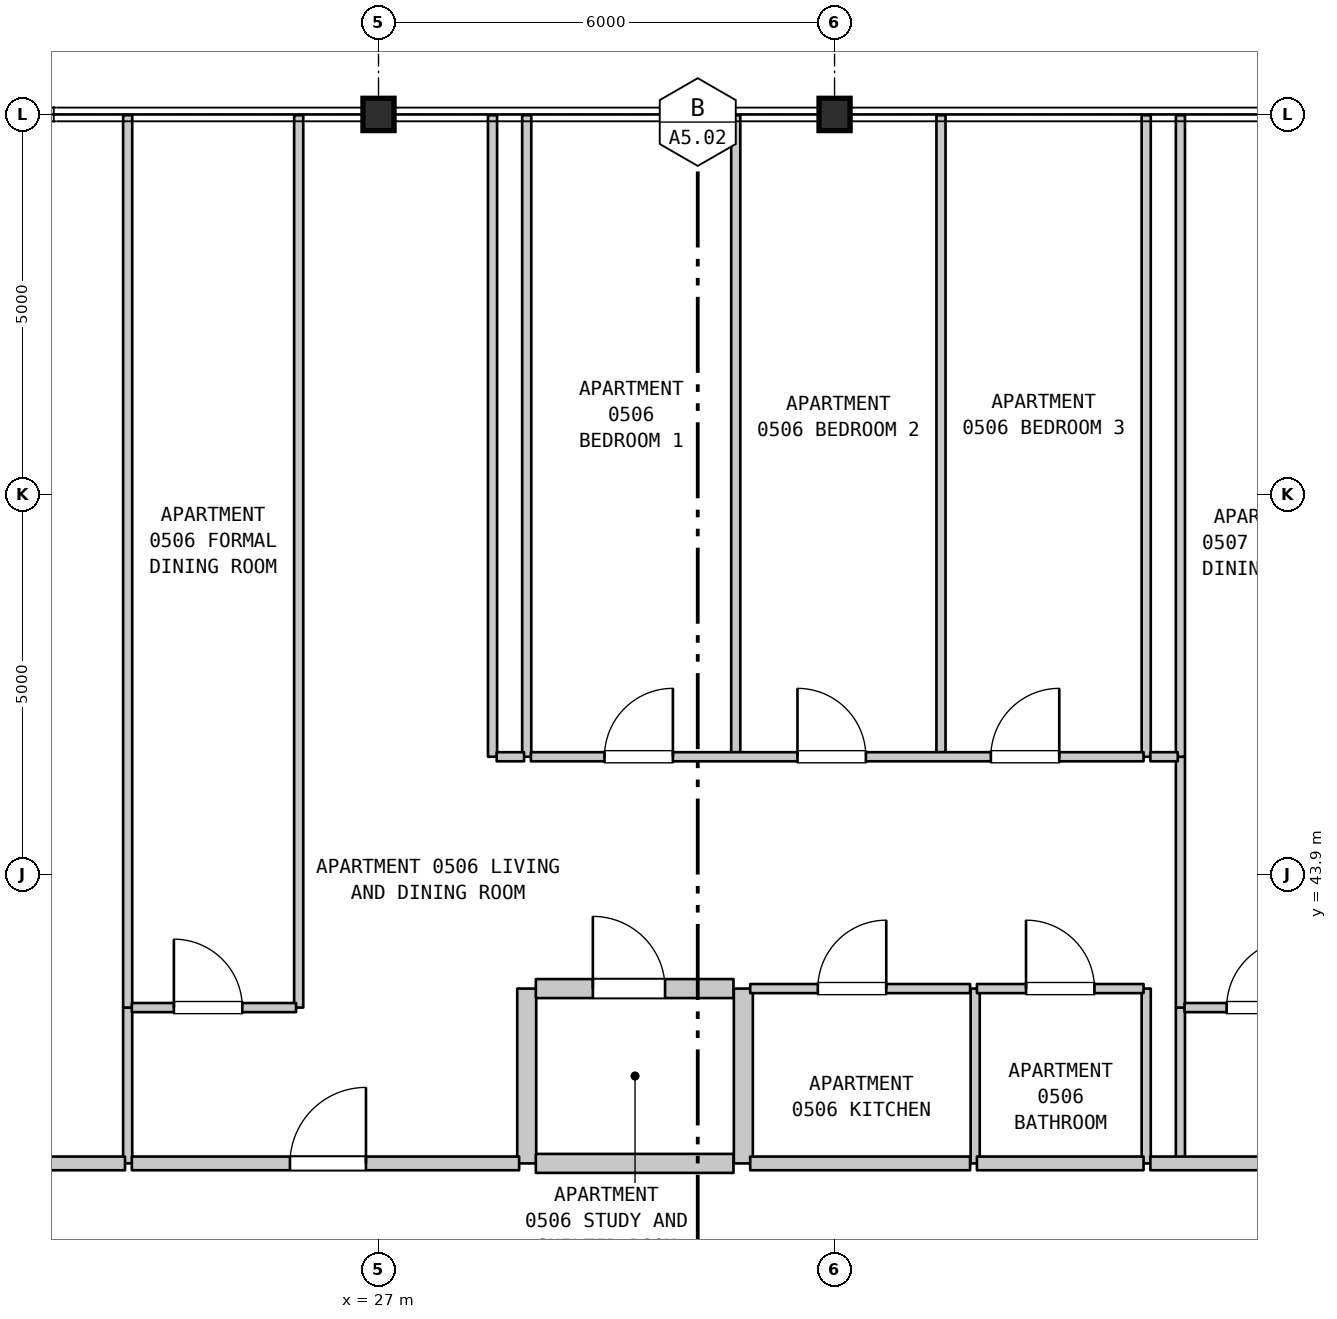
"""IFC4 building model, lengths in metres.
Left out: names, types, materials, properties, quantities, classifications, styles, units other than length and angle.
Written with IfcOpenShell. Run it as: python <this file> out.ifc"""

import sys

from ifc_helpers import new_model, si_unit, direction, frame, frame_2d, origin, origin_2d, place, context, subcontext, project, spatial, rectangle, i_section, extrude, element, fill, save


model = new_model("IFC4")
c1 = context("Model", 3, precision=1e-05, world=origin(), true_north=direction((0.0, 1.0)))
c2 = subcontext(c1, "Body", "Model", "MODEL_VIEW")
j1 = project(units=[si_unit("LENGTHUNIT", "METRE"), si_unit("PLANEANGLEUNIT", "RADIAN")], contexts=[c1])
p1 = place(None, origin())
s1 = spatial("IfcSite", under=j1, at=p1, CompositionType="ELEMENT")
p2 = place(p1, origin())
s2 = spatial("IfcBuilding", under=s1, at=p2, CompositionType="ELEMENT")
p3 = place(p2, frame((0.0, 0.0, 27.7)))
s3 = spatial("IfcBuildingStorey", under=s2, at=p3, CompositionType="ELEMENT", Elevation=27.7)
for number, where, z_axis, x_axis in (
    (1, (27.0, 53.9, 0.0), (0.0, 0.0, 1.0), (1.0, 0.0, 0.0)),
    (2, (33.0, 53.9, 0.0), (0.0, 0.0, 1.0), (1.0, 0.0, 0.0)),
):
    element("IfcColumn", number, at=place(p3, frame(where, z_axis=z_axis, x_axis=x_axis)), inside=s3, PredefinedType="COLUMN", context=c2, shape_type="SweptSolid", body=[
        extrude(i_section(OverallWidth=0.409, OverallDepth=0.425, WebThickness=0.032, FlangeThickness=0.052, FilletRadius=0.015, at=origin_2d()), origin(), (0.0, 0.0, 1.0), 3.7),
    ])
p4 = place(p3, frame((23.7, 40.1, 0.0), z_axis=(0.0, 0.0, 1.0), x_axis=(0.0, 1.0, 0.0)))
e3 = element("IfcWall", 3, at=p4, inside=s3, PredefinedType="PARTITIONING", context=c2, shape_type="SweptSolid", body=[
    extrude(rectangle(XDim=2.05, YDim=0.12, at=frame_2d((1.025, 0.0))), origin(), (0.0, 0.0, 1.0), 3.385),
])
for number, where, z_axis, x_axis in (
    (4, (23.7, 42.15, 0.0), (0.0, 0.0, 1.0), (0.0, 1.0, 0.0)),
    (5, (25.95, 42.15, 0.0), (0.0, 0.0, 1.0), (0.0, 1.0, 0.0)),
):
    element("IfcWall", number, at=place(p3, frame(where, z_axis=z_axis, x_axis=x_axis)), inside=s3, PredefinedType="PARTITIONING", context=c2, shape_type="SweptSolid", body=[
        extrude(rectangle(XDim=11.74, YDim=0.12, at=frame_2d((5.87, 0.0))), origin(), (0.0, 0.0, 1.0), 3.385),
    ])
p5 = place(p3, frame((28.5, 45.45, 0.0), z_axis=(0.0, 0.0, 1.0), x_axis=(0.0, 1.0, 0.0)))
e6 = element("IfcWall", 6, at=p5, inside=s3, PredefinedType="PARTITIONING", context=c2, shape_type="SweptSolid", body=[
    extrude(rectangle(XDim=8.44, YDim=0.12, at=frame_2d((4.22, 0.0))), origin(), (0.0, 0.0, 1.0), 3.385),
])
p6 = place(p3, frame((28.95, 40.1, 0.0), z_axis=(0.0, 0.0, 1.0), x_axis=(0.0, 1.0, 0.0)))
e7 = element("IfcWall", 7, at=p6, inside=s3, PredefinedType="STANDARD", context=c2, shape_type="SweptSolid", body=[
    extrude(rectangle(XDim=2.3, YDim=0.25, at=frame_2d((1.15, 0.0))), origin(), (0.0, 0.0, 1.0), 3.385),
])
for number, where, z_axis, x_axis in (
    (8, (28.95, 45.45, 0.0), (0.0, 0.0, 1.0), (0.0, 1.0, 0.0)),
    (9, (31.7, 45.45, 0.0), (0.0, 0.0, 1.0), (0.0, 1.0, 0.0)),
):
    element("IfcWall", number, at=place(p3, frame(where, z_axis=z_axis, x_axis=x_axis)), inside=s3, PredefinedType="PARTITIONING", context=c2, shape_type="SweptSolid", body=[
        extrude(rectangle(XDim=8.44, YDim=0.12, at=frame_2d((4.22, 0.0))), origin(), (0.0, 0.0, 1.0), 3.385),
    ])
p7 = place(p3, frame((31.8, 40.1, 0.0), z_axis=(0.0, 0.0, 1.0), x_axis=(0.0, 1.0, 0.0)))
e10 = element("IfcWall", 10, at=p7, inside=s3, PredefinedType="STANDARD", context=c2, shape_type="SweptSolid", body=[
    extrude(rectangle(XDim=2.3, YDim=0.25, at=frame_2d((1.15, 0.0))), origin(), (0.0, 0.0, 1.0), 3.385),
])
p8 = place(p3, frame((34.4, 45.45, 0.0), z_axis=(0.0, 0.0, 1.0), x_axis=(0.0, 1.0, 0.0)))
e11 = element("IfcWall", 11, at=p8, inside=s3, PredefinedType="PARTITIONING", context=c2, shape_type="SweptSolid", body=[
    extrude(rectangle(XDim=8.44, YDim=0.12, at=frame_2d((4.22, 0.0))), origin(), (0.0, 0.0, 1.0), 3.385),
])
for number, where, z_axis, x_axis in (
    (12, (34.85, 40.1, 0.0), (0.0, 0.0, 1.0), (0.0, 1.0, 0.0)),
    (13, (37.1, 40.1, 0.0), (0.0, 0.0, 1.0), (0.0, 1.0, 0.0)),
):
    element("IfcWall", number, at=place(p3, frame(where, z_axis=z_axis, x_axis=x_axis)), inside=s3, PredefinedType="PARTITIONING", context=c2, shape_type="SweptSolid", body=[
        extrude(rectangle(XDim=2.3, YDim=0.12, at=frame_2d((1.15, 0.0))), origin(), (0.0, 0.0, 1.0), 3.385),
    ])
p9 = place(p3, frame((37.1, 45.45, 0.0), z_axis=(0.0, 0.0, 1.0), x_axis=(0.0, 1.0, 0.0)))
e14 = element("IfcWall", 14, at=p9, inside=s3, PredefinedType="PARTITIONING", context=c2, shape_type="SweptSolid", body=[
    extrude(rectangle(XDim=8.44, YDim=0.12, at=frame_2d((4.22, 0.0))), origin(), (0.0, 0.0, 1.0), 3.385),
])
p10 = place(p3, frame((37.55, 40.1, 0.0), z_axis=(0.0, 0.0, 1.0), x_axis=(0.0, 1.0, 0.0)))
e15 = element("IfcWall", 15, at=p10, inside=s3, PredefinedType="PARTITIONING", context=c2, shape_type="SweptSolid", body=[
    extrude(rectangle(XDim=2.05, YDim=0.12, at=frame_2d((1.025, 0.0))), origin(), (0.0, 0.0, 1.0), 3.385),
])
p11 = place(p3, frame((37.55, 42.15, 0.0), z_axis=(0.0, 0.0, 1.0), x_axis=(0.0, 1.0, 0.0)))
e16 = element("IfcWall", 16, at=p11, inside=s3, PredefinedType="PARTITIONING", context=c2, shape_type="SweptSolid", body=[
    extrude(rectangle(XDim=3.3, YDim=0.12, at=frame_2d((1.65, 0.0))), origin(), (0.0, 0.0, 1.0), 3.385),
])
p12 = place(p3, frame((37.55, 45.45, 0.0), z_axis=(0.0, 0.0, 1.0), x_axis=(0.0, 1.0, 0.0)))
e17 = element("IfcWall", 17, at=p12, inside=s3, PredefinedType="PARTITIONING", context=c2, shape_type="SweptSolid", body=[
    extrude(rectangle(XDim=8.44, YDim=0.12, at=frame_2d((4.22, 0.0))), origin(), (0.0, 0.0, 1.0), 3.385),
])
p13 = place(p3, frame((21.255, 40.1, 0.0), z_axis=(0.0, 0.0, 1.0), x_axis=(1.0, 0.0, 0.0)))
e18 = element("IfcWall", 18, at=p13, inside=s3, PredefinedType="STANDARD", context=c2, shape_type="SweptSolid", body=[
    extrude(rectangle(XDim=2.41, YDim=0.18, at=frame_2d((1.205, 0.0))), origin(), (0.0, 0.0, 1.0), 3.385),
])
p14 = place(p3, frame((23.755, 40.1, 0.0), z_axis=(0.0, 0.0, 1.0), x_axis=(1.0, 0.0, 0.0)))
e19 = element("IfcWall", 19, at=p14, inside=s3, PredefinedType="STANDARD", context=c2, shape_type="SweptSolid", body=[
    extrude(rectangle(XDim=5.095, YDim=0.18, at=frame_2d((2.548, 0.0))), origin(), (0.0, 0.0, 1.0), 3.385),
])
p15 = place(p14, frame((2.08, 0.0, 0.0)))
e20 = element("IfcOpeningElement", 20, at=p15, cuts=e19, PredefinedType="OPENING", context=c2, shape_type="SweptSolid", body=[
    extrude(rectangle(XDim=1.0, YDim=2.15, at=frame_2d((0.5, 1.075))), frame((0.0, 0.1, 0.0), z_axis=(0.0, -1.0, 0.0), x_axis=(1.0, 0.0, 0.0)), (0.0, 0.0, 1.0), 0.2),
])
p16 = place(p3, frame((29.07, 40.1, 0.0), z_axis=(0.0, 0.0, 1.0), x_axis=(1.0, 0.0, 0.0)))
e21 = element("IfcWall", 21, at=p16, inside=s3, PredefinedType="STANDARD", context=c2, shape_type="SweptSolid", body=[
    extrude(rectangle(XDim=2.6, YDim=0.25, at=frame_2d((1.3, 0.0))), origin(), (0.0, 0.0, 1.0), 3.385),
])
p17 = place(p3, frame((31.89, 40.1, 0.0), z_axis=(0.0, 0.0, 1.0), x_axis=(1.0, 0.0, 0.0)))
e22 = element("IfcWall", 22, at=p17, inside=s3, PredefinedType="STANDARD", context=c2, shape_type="SweptSolid", body=[
    extrude(rectangle(XDim=2.893, YDim=0.18, at=frame_2d((1.447, 0.0))), origin(), (0.0, 0.0, 1.0), 3.385),
])
p18 = place(p3, frame((34.873, 40.1, 0.0), z_axis=(0.0, 0.0, 1.0), x_axis=(1.0, 0.0, 0.0)))
e23 = element("IfcWall", 23, at=p18, inside=s3, PredefinedType="STANDARD", context=c2, shape_type="SweptSolid", body=[
    extrude(rectangle(XDim=2.192, YDim=0.18, at=frame_2d((1.096, 0.0))), origin(), (0.0, 0.0, 1.0), 3.385),
])
p19 = place(p3, frame((37.155, 40.1, 0.0), z_axis=(0.0, 0.0, 1.0), x_axis=(1.0, 0.0, 0.0)))
e24 = element("IfcWall", 24, at=p19, inside=s3, PredefinedType="STANDARD", context=c2, shape_type="SweptSolid", body=[
    extrude(rectangle(XDim=5.3, YDim=0.18, at=frame_2d((2.65, 0.0))), origin(), (0.0, 0.0, 1.0), 3.385),
])
p20 = place(p19, frame((2.15, 0.0, 0.0)))
e25 = element("IfcOpeningElement", 25, at=p20, cuts=e24, PredefinedType="OPENING", context=c2, shape_type="SweptSolid", body=[
    extrude(rectangle(XDim=1.0, YDim=2.15, at=frame_2d((0.5, 1.075))), frame((0.0, 0.1, 0.0), z_axis=(0.0, -1.0, 0.0), x_axis=(1.0, 0.0, 0.0)), (0.0, 0.0, 1.0), 0.2),
])
p21 = place(p3, frame((23.755, 42.15, 0.0), z_axis=(0.0, 0.0, 1.0), x_axis=(1.0, 0.0, 0.0)))
e26 = element("IfcWall", 26, at=p21, inside=s3, PredefinedType="PARTITIONING", context=c2, shape_type="SweptSolid", body=[
    extrude(rectangle(XDim=2.16, YDim=0.12, at=frame_2d((1.08, 0.0))), origin(), (0.0, 0.0, 1.0), 3.385),
])
p22 = place(p21, frame((0.553, 0.0, 0.0)))
e27 = element("IfcOpeningElement", 27, at=p22, cuts=e26, PredefinedType="OPENING", context=c2, shape_type="SweptSolid", body=[
    extrude(rectangle(XDim=0.9, YDim=2.15, at=frame_2d((0.45, 1.075))), frame((0.0, 0.07, 0.0), z_axis=(0.0, -1.0, 0.0), x_axis=(1.0, 0.0, 0.0)), (0.0, 0.0, 1.0), 0.14),
])
p23 = place(p3, frame((37.605, 42.15, 0.0), z_axis=(0.0, 0.0, 1.0), x_axis=(1.0, 0.0, 0.0)))
e28 = element("IfcWall", 28, at=p23, inside=s3, PredefinedType="PARTITIONING", context=c2, shape_type="SweptSolid", body=[
    extrude(rectangle(XDim=2.16, YDim=0.12, at=frame_2d((1.08, 0.0))), origin(), (0.0, 0.0, 1.0), 3.385),
])
p24 = place(p23, frame((0.553, 0.0, 0.0)))
e29 = element("IfcOpeningElement", 29, at=p24, cuts=e28, PredefinedType="OPENING", context=c2, shape_type="SweptSolid", body=[
    extrude(rectangle(XDim=0.9, YDim=2.15, at=frame_2d((0.45, 1.075))), frame((0.0, 0.07, 0.0), z_axis=(0.0, -1.0, 0.0), x_axis=(1.0, 0.0, 0.0)), (0.0, 0.0, 1.0), 0.14),
])
p25 = place(p3, frame((29.07, 42.4, 0.0), z_axis=(0.0, 0.0, 1.0), x_axis=(1.0, 0.0, 0.0)))
e30 = element("IfcWall", 30, at=p25, inside=s3, PredefinedType="STANDARD", context=c2, shape_type="SweptSolid", body=[
    extrude(rectangle(XDim=2.6, YDim=0.25, at=frame_2d((1.3, 0.0))), origin(), (0.0, 0.0, 1.0), 3.385),
])
p26 = place(p25, frame((0.75, 0.0, 0.0)))
e31 = element("IfcOpeningElement", 31, at=p26, cuts=e30, PredefinedType="OPENING", context=c2, shape_type="SweptSolid", body=[
    extrude(rectangle(XDim=0.95, YDim=2.15, at=frame_2d((0.475, 1.075))), frame((0.0, 0.135, 0.0), z_axis=(0.0, -1.0, 0.0), x_axis=(1.0, 0.0, 0.0)), (0.0, 0.0, 1.0), 0.27),
])
p27 = place(p3, frame((31.89, 42.4, 0.0), z_axis=(0.0, 0.0, 1.0), x_axis=(1.0, 0.0, 0.0)))
e32 = element("IfcWall", 32, at=p27, inside=s3, PredefinedType="PARTITIONING", context=c2, shape_type="SweptSolid", body=[
    extrude(rectangle(XDim=2.893, YDim=0.12, at=frame_2d((1.447, 0.0))), origin(), (0.0, 0.0, 1.0), 3.385),
])
p28 = place(p27, frame((0.89, 0.0, 0.0)))
e33 = element("IfcOpeningElement", 33, at=p28, cuts=e32, PredefinedType="OPENING", context=c2, shape_type="SweptSolid", body=[
    extrude(rectangle(XDim=0.9, YDim=2.15, at=frame_2d((0.45, 1.075))), frame((0.0, 0.07, 0.0), z_axis=(0.0, -1.0, 0.0), x_axis=(1.0, 0.0, 0.0)), (0.0, 0.0, 1.0), 0.14),
])
p29 = place(p3, frame((34.873, 42.4, 0.0), z_axis=(0.0, 0.0, 1.0), x_axis=(1.0, 0.0, 0.0)))
e34 = element("IfcWall", 34, at=p29, inside=s3, PredefinedType="PARTITIONING", context=c2, shape_type="SweptSolid", body=[
    extrude(rectangle(XDim=2.192, YDim=0.12, at=frame_2d((1.096, 0.0))), origin(), (0.0, 0.0, 1.0), 3.385),
])
p30 = place(p29, frame((0.646, 0.0, 0.0)))
e35 = element("IfcOpeningElement", 35, at=p30, cuts=e34, PredefinedType="OPENING", context=c2, shape_type="SweptSolid", body=[
    extrude(rectangle(XDim=0.9, YDim=2.1, at=frame_2d((0.45, 1.05))), frame((0.0, 0.07, 0.0), z_axis=(0.0, -1.0, 0.0), x_axis=(1.0, 0.0, 0.0)), (0.0, 0.0, 1.0), 0.14),
])
p31 = place(p3, frame((28.555, 45.45, 0.0), z_axis=(0.0, 0.0, 1.0), x_axis=(1.0, 0.0, 0.0)))
e36 = element("IfcWall", 36, at=p31, inside=s3, PredefinedType="PARTITIONING", context=c2, shape_type="SweptSolid", body=[
    extrude(rectangle(XDim=0.36, YDim=0.12, at=frame_2d((0.18, 0.0))), origin(), (0.0, 0.0, 1.0), 3.385),
])
p32 = place(p3, frame((29.005, 45.45, 0.0), z_axis=(0.0, 0.0, 1.0), x_axis=(1.0, 0.0, 0.0)))
e37 = element("IfcWall", 37, at=p32, inside=s3, PredefinedType="PARTITIONING", context=c2, shape_type="SweptSolid", body=[
    extrude(rectangle(XDim=8.06, YDim=0.12, at=frame_2d((4.03, 0.0))), origin(), (0.0, 0.0, 1.0), 3.385),
])
p33 = place(p32, frame((0.968, 0.0, 0.0)))
e38 = element("IfcOpeningElement", 38, at=p33, cuts=e37, PredefinedType="OPENING", context=c2, shape_type="SweptSolid", body=[
    extrude(rectangle(XDim=0.9, YDim=2.15, at=frame_2d((0.45, 1.075))), frame((0.0, 0.07, 0.0), z_axis=(0.0, -1.0, 0.0), x_axis=(1.0, 0.0, 0.0)), (0.0, 0.0, 1.0), 0.14),
])
p34 = place(p32, frame((3.507, 0.0, 0.0)))
e39 = element("IfcOpeningElement", 39, at=p34, cuts=e37, PredefinedType="OPENING", context=c2, shape_type="SweptSolid", body=[
    extrude(rectangle(XDim=0.9, YDim=2.15, at=frame_2d((0.45, 1.075))), frame((0.0, 0.07, 0.0), z_axis=(0.0, -1.0, 0.0), x_axis=(1.0, 0.0, 0.0)), (0.0, 0.0, 1.0), 0.14),
])
p35 = place(p32, frame((6.051, 0.0, 0.0)))
e40 = element("IfcOpeningElement", 40, at=p35, cuts=e37, PredefinedType="OPENING", context=c2, shape_type="SweptSolid", body=[
    extrude(rectangle(XDim=0.9, YDim=2.15, at=frame_2d((0.45, 1.075))), frame((0.0, 0.07, 0.0), z_axis=(0.0, -1.0, 0.0), x_axis=(1.0, 0.0, 0.0)), (0.0, 0.0, 1.0), 0.14),
])
p36 = place(p3, frame((37.155, 45.45, 0.0), z_axis=(0.0, 0.0, 1.0), x_axis=(1.0, 0.0, 0.0)))
e41 = element("IfcWall", 41, at=p36, inside=s3, PredefinedType="PARTITIONING", context=c2, shape_type="SweptSolid", body=[
    extrude(rectangle(XDim=0.36, YDim=0.12, at=frame_2d((0.18, 0.0))), origin(), (0.0, 0.0, 1.0), 3.385),
])
p37 = place(p15, origin())
e42 = element("IfcDoor", 42, at=p37, inside=s3, OperationType="SINGLE_SWING_RIGHT", PredefinedType="DOOR", context=c2, shape_type="SweptSolid", body=[
    extrude(rectangle(XDim=1.0, YDim=2.15, at=frame_2d((0.5, 1.075))), frame((0.0, 0.025, 0.0), z_axis=(0.0, -1.0, 0.0), x_axis=(1.0, 0.0, 0.0)), (0.0, 0.0, 1.0), 0.05),
])
fill(e20, e42)
p38 = place(p22, origin())
e43 = element("IfcDoor", 43, at=p38, inside=s3, OperationType="SINGLE_SWING_LEFT", PredefinedType="DOOR", context=c2, shape_type="SweptSolid", body=[
    extrude(rectangle(XDim=0.9, YDim=2.15, at=frame_2d((0.45, 1.075))), frame((0.0, 0.025, 0.0), z_axis=(0.0, -1.0, 0.0), x_axis=(1.0, 0.0, 0.0)), (0.0, 0.0, 1.0), 0.05),
])
fill(e27, e43)
p39 = place(p24, origin())
e44 = element("IfcDoor", 44, at=p39, inside=s3, OperationType="SINGLE_SWING_RIGHT", PredefinedType="DOOR", context=c2, shape_type="SweptSolid", body=[
    extrude(rectangle(XDim=0.9, YDim=2.15, at=frame_2d((0.45, 1.075))), frame((0.0, 0.025, 0.0), z_axis=(0.0, -1.0, 0.0), x_axis=(1.0, 0.0, 0.0)), (0.0, 0.0, 1.0), 0.05),
])
fill(e29, e44)
p40 = place(p26, origin())
e45 = element("IfcDoor", 45, at=p40, inside=s3, OperationType="SINGLE_SWING_LEFT", PredefinedType="DOOR", context=c2, shape_type="SweptSolid", body=[
    extrude(rectangle(XDim=0.95, YDim=2.15, at=frame_2d((0.475, 1.075))), frame((0.0, 0.025, 0.0), z_axis=(0.0, -1.0, 0.0), x_axis=(1.0, 0.0, 0.0)), (0.0, 0.0, 1.0), 0.05),
])
fill(e31, e45)
p41 = place(p28, origin())
e46 = element("IfcDoor", 46, at=p41, inside=s3, OperationType="SINGLE_SWING_RIGHT", PredefinedType="DOOR", context=c2, shape_type="SweptSolid", body=[
    extrude(rectangle(XDim=0.9, YDim=2.15, at=frame_2d((0.45, 1.075))), frame((0.0, 0.025, 0.0), z_axis=(0.0, -1.0, 0.0), x_axis=(1.0, 0.0, 0.0)), (0.0, 0.0, 1.0), 0.05),
])
fill(e33, e46)
p42 = place(p30, origin())
e47 = element("IfcDoor", 47, at=p42, inside=s3, OperationType="SINGLE_SWING_LEFT", PredefinedType="DOOR", context=c2, shape_type="SweptSolid", body=[
    extrude(rectangle(XDim=0.9, YDim=2.1, at=frame_2d((0.45, 1.05))), frame((0.0, 0.025, 0.0), z_axis=(0.0, -1.0, 0.0), x_axis=(1.0, 0.0, 0.0)), (0.0, 0.0, 1.0), 0.05),
])
fill(e35, e47)
p43 = place(p33, origin())
e48 = element("IfcDoor", 48, at=p43, inside=s3, OperationType="SINGLE_SWING_RIGHT", PredefinedType="DOOR", context=c2, shape_type="SweptSolid", body=[
    extrude(rectangle(XDim=0.9, YDim=2.15, at=frame_2d((0.45, 1.075))), frame((0.0, 0.025, 0.0), z_axis=(0.0, -1.0, 0.0), x_axis=(1.0, 0.0, 0.0)), (0.0, 0.0, 1.0), 0.05),
])
fill(e38, e48)
p44 = place(p34, origin())
e49 = element("IfcDoor", 49, at=p44, inside=s3, OperationType="SINGLE_SWING_LEFT", PredefinedType="DOOR", context=c2, shape_type="SweptSolid", body=[
    extrude(rectangle(XDim=0.9, YDim=2.15, at=frame_2d((0.45, 1.075))), frame((0.0, 0.025, 0.0), z_axis=(0.0, -1.0, 0.0), x_axis=(1.0, 0.0, 0.0)), (0.0, 0.0, 1.0), 0.05),
])
fill(e39, e49)
p45 = place(p35, origin())
e50 = element("IfcDoor", 50, at=p45, inside=s3, OperationType="SINGLE_SWING_RIGHT", PredefinedType="DOOR", context=c2, shape_type="SweptSolid", body=[
    extrude(rectangle(XDim=0.9, YDim=2.15, at=frame_2d((0.45, 1.075))), frame((0.0, 0.025, 0.0), z_axis=(0.0, -1.0, 0.0), x_axis=(1.0, 0.0, 0.0)), (0.0, 0.0, 1.0), 0.05),
])
fill(e40, e50)
save(model, sys.argv[1])
